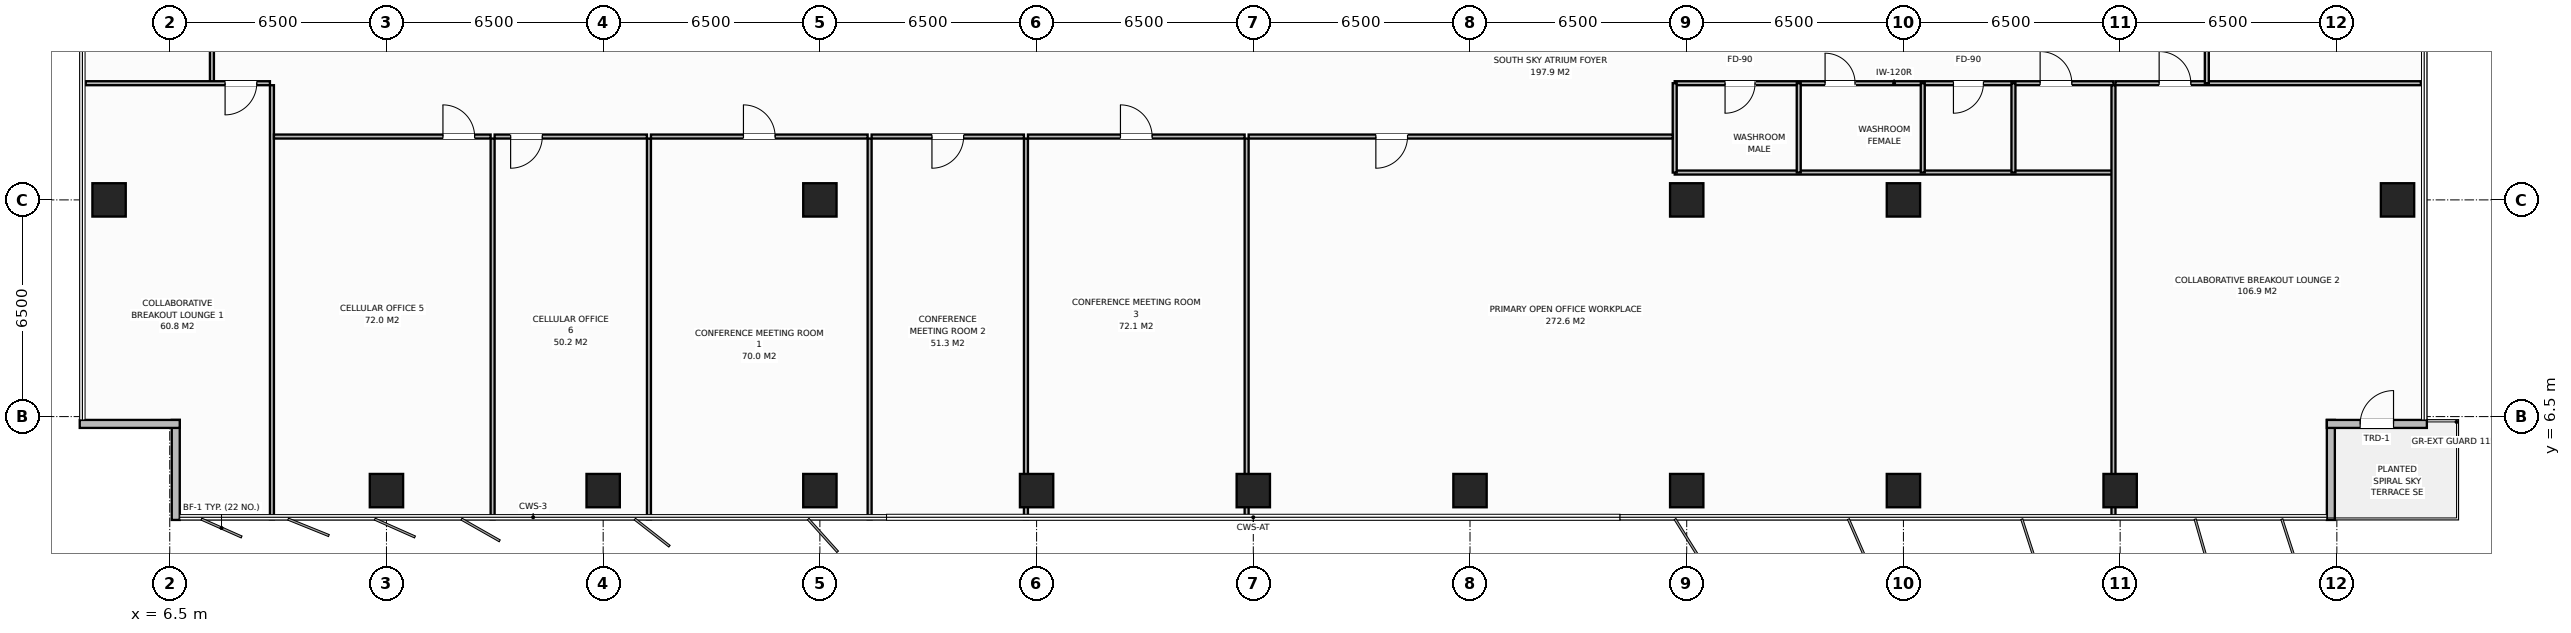
"""IFC4 building model, lengths in metres.
Left out: names, types, materials, properties, quantities, classifications, styles, units other than length and angle.
Written with IfcOpenShell. Run it as: python <this file> out.ifc"""

import sys

from ifc_helpers import new_model, si_unit, direction, frame, frame_2d, origin, origin_2d, place, context, subcontext, project, spatial, rectangle, extrude, element, fill, save


model = new_model("IFC4")
c1 = context("Model", 3, precision=1e-05, world=origin(), true_north=direction((0.0, 1.0)))
c2 = subcontext(c1, "Body", "Model", "MODEL_VIEW")
j1 = project(units=[si_unit("LENGTHUNIT", "METRE"), si_unit("PLANEANGLEUNIT", "RADIAN")], contexts=[c1])
p1 = place(None, origin())
s1 = spatial("IfcSite", under=j1, at=p1, CompositionType="ELEMENT")
p2 = place(p1, origin())
s2 = spatial("IfcBuilding", under=s1, at=p2, CompositionType="ELEMENT")
p3 = place(p2, frame((0.0, 0.0, 182.2)))
s3 = spatial("IfcBuildingStorey", under=s2, at=p3, CompositionType="ELEMENT", Elevation=182.2)
for number, where, z_axis, x_axis in (
    (1, (58.5, 13.0, 0.0), (0.0, 0.0, 1.0), (1.0, 0.0, 0.0)),
    (2, (26.0, 13.0, 0.0), (0.0, 0.0, 1.0), (1.0, 0.0, 0.0)),
    (3, (52.0, 13.0, 0.0), (0.0, 0.0, 1.0), (1.0, 0.0, 0.0)),
    (4, (13.0, 4.28, 0.0), (0.0, 0.0, 1.0), (1.0, 0.0, 0.0)),
    (5, (19.5, 4.28, 0.0), (0.0, 0.0, 1.0), (1.0, 0.0, 0.0)),
    (6, (26.0, 4.28, 0.0), (0.0, 0.0, 1.0), (1.0, 0.0, 0.0)),
    (7, (32.5, 4.28, 0.0), (0.0, 0.0, 1.0), (1.0, 0.0, 0.0)),
    (8, (39.0, 4.28, 0.0), (0.0, 0.0, 1.0), (1.0, 0.0, 0.0)),
    (9, (45.5, 4.28, 0.0), (0.0, 0.0, 1.0), (1.0, 0.0, 0.0)),
    (10, (52.0, 4.28, 0.0), (0.0, 0.0, 1.0), (1.0, 0.0, 0.0)),
    (11, (58.5, 4.28, 0.0), (0.0, 0.0, 1.0), (1.0, 0.0, 0.0)),
    (12, (65.0, 4.28, 0.0), (0.0, 0.0, 1.0), (1.0, 0.0, 0.0)),
    (13, (4.68, 13.0, 0.0), (0.0, 0.0, 1.0), (1.0, 0.0, 0.0)),
    (14, (73.32, 13.0, 0.0), (0.0, 0.0, 1.0), (1.0, 0.0, 0.0)),
):
    element("IfcColumn", number, at=place(p3, frame(where, z_axis=z_axis, x_axis=x_axis)), inside=s3, PredefinedType="COLUMN", context=c2, shape_type="SweptSolid", body=[
        extrude(rectangle(XDim=1.0, YDim=1.0, at=origin_2d()), origin(), (0.0, 0.0, 1.0), 3.8),
    ])
for number, where, z_axis, x_axis in (
    (15, (6.68, 3.4, 0.0), (0.0, 0.0, 1.0), (0.0, 1.0, 0.0)),
    (16, (6.8, 6.28, 0.0), (0.0, 0.0, 1.0), (-1.0, 0.0, 0.0)),
    (17, (71.32, 6.4, 0.0), (0.0, 0.0, 1.0), (0.0, -1.0, 0.0)),
):
    element("IfcWall", number, at=place(p3, frame(where, z_axis=z_axis, x_axis=x_axis)), inside=s3, PredefinedType="STANDARD", context=c2, shape_type="SweptSolid", body=[
        extrude(rectangle(XDim=3.0, YDim=0.24, at=frame_2d((1.5, 0.0))), origin(), (0.0, 0.0, 1.0), 3.572),
    ])
p4 = place(p3, frame((74.2, 6.28, 0.0), z_axis=(0.0, 0.0, 1.0), x_axis=(-1.0, 0.0, 0.0)))
e18 = element("IfcWall", 18, at=p4, inside=s3, PredefinedType="STANDARD", context=c2, shape_type="SweptSolid", body=[
    extrude(rectangle(XDim=3.0, YDim=0.24, at=frame_2d((1.5, 0.0))), origin(), (0.0, 0.0, 1.0), 3.572),
])
p5 = place(p4, frame((1.0, 0.0, 0.0)))
e19 = element("IfcOpeningElement", 19, at=p5, cuts=e18, PredefinedType="OPENING", context=c2, shape_type="SweptSolid", body=[
    extrude(rectangle(XDim=1.0, YDim=2.2, at=frame_2d((0.5, 1.1))), frame((0.0, 0.13, 0.0), z_axis=(0.0, -1.0, 0.0), x_axis=(1.0, 0.0, 0.0)), (0.0, 0.0, 1.0), 0.26),
])
p6 = place(p3, frame((7.765, 16.5, 0.0), z_axis=(0.0, 0.0, 1.0), x_axis=(0.0, 1.0, 0.0)))
e20 = element("IfcWall", 20, at=p6, inside=s3, PredefinedType="PARTITIONING", context=c2, shape_type="SweptSolid", body=[
    extrude(rectangle(XDim=2.1, YDim=0.12, at=frame_2d((1.05, 0.0))), origin(), (0.0, 0.0, 1.0), 3.572),
])
p7 = place(p3, frame((51.64, 16.5, 0.0), z_axis=(0.0, 0.0, 1.0), x_axis=(1.0, 0.0, 0.0)))
e21 = element("IfcWall", 21, at=p7, inside=s3, PredefinedType="PARTITIONING", context=c2, shape_type="SweptSolid", body=[
    extrude(rectangle(XDim=13.16, YDim=0.12, at=frame_2d((6.58, 0.0))), origin(), (0.0, 0.0, 1.0), 3.572),
])
p8 = place(p7, frame((1.51, 0.0, 0.0)))
e22 = element("IfcOpeningElement", 22, at=p8, cuts=e21, PredefinedType="OPENING", context=c2, shape_type="SweptSolid", body=[
    extrude(rectangle(XDim=0.9, YDim=2.15, at=frame_2d((0.45, 1.075))), frame((0.0, 0.07, 0.0), z_axis=(0.0, -1.0, 0.0), x_axis=(1.0, 0.0, 0.0)), (0.0, 0.0, 1.0), 0.14),
])
p9 = place(p7, frame((4.51, 0.0, 0.0)))
e23 = element("IfcOpeningElement", 23, at=p9, cuts=e21, PredefinedType="OPENING", context=c2, shape_type="SweptSolid", body=[
    extrude(rectangle(XDim=0.9, YDim=2.15, at=frame_2d((0.45, 1.075))), frame((0.0, 0.07, 0.0), z_axis=(0.0, -1.0, 0.0), x_axis=(1.0, 0.0, 0.0)), (0.0, 0.0, 1.0), 0.14),
])
p10 = place(p7, frame((8.36, 0.0, 0.0)))
e24 = element("IfcOpeningElement", 24, at=p10, cuts=e21, PredefinedType="OPENING", context=c2, shape_type="SweptSolid", body=[
    extrude(rectangle(XDim=0.9, YDim=2.15, at=frame_2d((0.45, 1.075))), frame((0.0, 0.07, 0.0), z_axis=(0.0, -1.0, 0.0), x_axis=(1.0, 0.0, 0.0)), (0.0, 0.0, 1.0), 0.14),
])
p11 = place(p7, frame((10.96, 0.0, 0.0)))
e25 = element("IfcOpeningElement", 25, at=p11, cuts=e21, PredefinedType="OPENING", context=c2, shape_type="SweptSolid", body=[
    extrude(rectangle(XDim=0.95, YDim=2.15, at=frame_2d((0.475, 1.075))), frame((0.0, 0.07, 0.0), z_axis=(0.0, -1.0, 0.0), x_axis=(1.0, 0.0, 0.0)), (0.0, 0.0, 1.0), 0.14),
])
p12 = place(p3, frame((51.64, 13.82, 0.0), z_axis=(0.0, 0.0, 1.0), x_axis=(1.0, 0.0, 0.0)))
e26 = element("IfcWall", 26, at=p12, inside=s3, PredefinedType="PARTITIONING", context=c2, shape_type="SweptSolid", body=[
    extrude(rectangle(XDim=13.16, YDim=0.12, at=frame_2d((6.58, 0.0))), origin(), (0.0, 0.0, 1.0), 3.572),
])
for number, where, z_axis, x_axis in (
    (27, (51.64, 13.82, 0.0), (0.0, 0.0, 1.0), (0.0, 1.0, 0.0)),
    (28, (55.36, 13.82, 0.0), (0.0, 0.0, 1.0), (0.0, 1.0, 0.0)),
    (29, (59.08, 13.82, 0.0), (0.0, 0.0, 1.0), (0.0, 1.0, 0.0)),
    (30, (61.8, 13.82, 0.0), (0.0, 0.0, 1.0), (0.0, 1.0, 0.0)),
):
    element("IfcWall", number, at=place(p3, frame(where, z_axis=z_axis, x_axis=x_axis)), inside=s3, PredefinedType="PARTITIONING", context=c2, shape_type="SweptSolid", body=[
        extrude(rectangle(XDim=2.68, YDim=0.12, at=frame_2d((1.34, 0.0))), origin(), (0.0, 0.0, 1.0), 3.572),
    ])
p13 = place(p3, frame((9.565, 3.42, 0.0), z_axis=(0.0, 0.0, 1.0), x_axis=(0.0, 1.0, 0.0)))
e31 = element("IfcWall", 31, at=p13, inside=s3, PredefinedType="PARTITIONING", context=c2, shape_type="SweptSolid", body=[
    extrude(rectangle(XDim=13.02, YDim=0.12, at=frame_2d((6.51, 0.0))), origin(), (0.0, 0.0, 1.0), 3.572),
])
p14 = place(p3, frame((3.98, 16.5, 0.0), z_axis=(0.0, 0.0, 1.0), x_axis=(1.0, 0.0, 0.0)))
e32 = element("IfcWall", 32, at=p14, inside=s3, PredefinedType="PARTITIONING", context=c2, shape_type="SweptSolid", body=[
    extrude(rectangle(XDim=5.525, YDim=0.12, at=frame_2d((2.762, 0.0))), origin(), (0.0, 0.0, 1.0), 3.572),
])
p15 = place(p14, frame((4.18, 0.0, 0.0)))
e33 = element("IfcOpeningElement", 33, at=p15, cuts=e32, PredefinedType="OPENING", context=c2, shape_type="SweptSolid", body=[
    extrude(rectangle(XDim=0.95, YDim=2.15, at=frame_2d((0.475, 1.075))), frame((0.0, 0.07, 0.0), z_axis=(0.0, -1.0, 0.0), x_axis=(1.0, 0.0, 0.0)), (0.0, 0.0, 1.0), 0.14),
])
p16 = place(p3, frame((16.184, 3.42, 0.0), z_axis=(0.0, 0.0, 1.0), x_axis=(0.0, 1.0, 0.0)))
e34 = element("IfcWall", 34, at=p16, inside=s3, PredefinedType="PARTITIONING", context=c2, shape_type="SweptSolid", body=[
    extrude(rectangle(XDim=11.42, YDim=0.12, at=frame_2d((5.71, 0.0))), origin(), (0.0, 0.0, 1.0), 3.572),
])
p17 = place(p3, frame((9.625, 14.9, 0.0), z_axis=(0.0, 0.0, 1.0), x_axis=(1.0, 0.0, 0.0)))
e35 = element("IfcWall", 35, at=p17, inside=s3, PredefinedType="PARTITIONING", context=c2, shape_type="SweptSolid", body=[
    extrude(rectangle(XDim=6.499, YDim=0.12, at=frame_2d((3.25, 0.0))), origin(), (0.0, 0.0, 1.0), 3.572),
])
p18 = place(p17, frame((5.069, 0.0, 0.0)))
e36 = element("IfcOpeningElement", 36, at=p18, cuts=e35, PredefinedType="OPENING", context=c2, shape_type="SweptSolid", body=[
    extrude(rectangle(XDim=0.95, YDim=2.15, at=frame_2d((0.475, 1.075))), frame((0.0, 0.07, 0.0), z_axis=(0.0, -1.0, 0.0), x_axis=(1.0, 0.0, 0.0)), (0.0, 0.0, 1.0), 0.14),
])
p19 = place(p3, frame((20.873, 3.42, 0.0), z_axis=(0.0, 0.0, 1.0), x_axis=(0.0, 1.0, 0.0)))
e37 = element("IfcWall", 37, at=p19, inside=s3, PredefinedType="PARTITIONING", context=c2, shape_type="SweptSolid", body=[
    extrude(rectangle(XDim=11.42, YDim=0.12, at=frame_2d((5.71, 0.0))), origin(), (0.0, 0.0, 1.0), 3.572),
])
p20 = place(p3, frame((16.244, 14.9, 0.0), z_axis=(0.0, 0.0, 1.0), x_axis=(1.0, 0.0, 0.0)))
e38 = element("IfcWall", 38, at=p20, inside=s3, PredefinedType="PARTITIONING", context=c2, shape_type="SweptSolid", body=[
    extrude(rectangle(XDim=4.569, YDim=0.12, at=frame_2d((2.284, 0.0))), origin(), (0.0, 0.0, 1.0), 3.572),
])
p21 = place(p20, frame((0.48, 0.0, 0.0)))
e39 = element("IfcOpeningElement", 39, at=p21, cuts=e38, PredefinedType="OPENING", context=c2, shape_type="SweptSolid", body=[
    extrude(rectangle(XDim=0.95, YDim=2.15, at=frame_2d((0.475, 1.075))), frame((0.0, 0.07, 0.0), z_axis=(0.0, -1.0, 0.0), x_axis=(1.0, 0.0, 0.0)), (0.0, 0.0, 1.0), 0.14),
])
p22 = place(p3, frame((27.492, 3.42, 0.0), z_axis=(0.0, 0.0, 1.0), x_axis=(0.0, 1.0, 0.0)))
e40 = element("IfcWall", 40, at=p22, inside=s3, PredefinedType="PARTITIONING", context=c2, shape_type="SweptSolid", body=[
    extrude(rectangle(XDim=11.42, YDim=0.12, at=frame_2d((5.71, 0.0))), origin(), (0.0, 0.0, 1.0), 3.572),
])
p23 = place(p3, frame((20.933, 14.9, 0.0), z_axis=(0.0, 0.0, 1.0), x_axis=(1.0, 0.0, 0.0)))
e41 = element("IfcWall", 41, at=p23, inside=s3, PredefinedType="PARTITIONING", context=c2, shape_type="SweptSolid", body=[
    extrude(rectangle(XDim=6.499, YDim=0.12, at=frame_2d((3.25, 0.0))), origin(), (0.0, 0.0, 1.0), 3.572),
])
p24 = place(p23, frame((2.775, 0.0, 0.0)))
e42 = element("IfcOpeningElement", 42, at=p24, cuts=e41, PredefinedType="OPENING", context=c2, shape_type="SweptSolid", body=[
    extrude(rectangle(XDim=0.95, YDim=2.15, at=frame_2d((0.475, 1.075))), frame((0.0, 0.07, 0.0), z_axis=(0.0, -1.0, 0.0), x_axis=(1.0, 0.0, 0.0)), (0.0, 0.0, 1.0), 0.14),
])
p25 = place(p3, frame((32.181, 3.42, 0.0), z_axis=(0.0, 0.0, 1.0), x_axis=(0.0, 1.0, 0.0)))
e43 = element("IfcWall", 43, at=p25, inside=s3, PredefinedType="PARTITIONING", context=c2, shape_type="SweptSolid", body=[
    extrude(rectangle(XDim=11.42, YDim=0.12, at=frame_2d((5.71, 0.0))), origin(), (0.0, 0.0, 1.0), 3.572),
])
p26 = place(p3, frame((27.552, 14.9, 0.0), z_axis=(0.0, 0.0, 1.0), x_axis=(1.0, 0.0, 0.0)))
e44 = element("IfcWall", 44, at=p26, inside=s3, PredefinedType="PARTITIONING", context=c2, shape_type="SweptSolid", body=[
    extrude(rectangle(XDim=4.569, YDim=0.12, at=frame_2d((2.284, 0.0))), origin(), (0.0, 0.0, 1.0), 3.572),
])
p27 = place(p26, frame((1.809, 0.0, 0.0)))
e45 = element("IfcOpeningElement", 45, at=p27, cuts=e44, PredefinedType="OPENING", context=c2, shape_type="SweptSolid", body=[
    extrude(rectangle(XDim=0.95, YDim=2.15, at=frame_2d((0.475, 1.075))), frame((0.0, 0.07, 0.0), z_axis=(0.0, -1.0, 0.0), x_axis=(1.0, 0.0, 0.0)), (0.0, 0.0, 1.0), 0.14),
])
p28 = place(p3, frame((38.8, 3.42, 0.0), z_axis=(0.0, 0.0, 1.0), x_axis=(0.0, 1.0, 0.0)))
e46 = element("IfcWall", 46, at=p28, inside=s3, PredefinedType="PARTITIONING", context=c2, shape_type="SweptSolid", body=[
    extrude(rectangle(XDim=11.42, YDim=0.12, at=frame_2d((5.71, 0.0))), origin(), (0.0, 0.0, 1.0), 3.022),
])
p29 = place(p3, frame((32.241, 14.9, 0.0), z_axis=(0.0, 0.0, 1.0), x_axis=(1.0, 0.0, 0.0)))
e47 = element("IfcWall", 47, at=p29, inside=s3, PredefinedType="PARTITIONING", context=c2, shape_type="SweptSolid", body=[
    extrude(rectangle(XDim=6.499, YDim=0.12, at=frame_2d((3.25, 0.0))), origin(), (0.0, 0.0, 1.0), 3.572),
])
p30 = place(p29, frame((2.775, 0.0, 0.0)))
e48 = element("IfcOpeningElement", 48, at=p30, cuts=e47, PredefinedType="OPENING", context=c2, shape_type="SweptSolid", body=[
    extrude(rectangle(XDim=0.95, YDim=2.15, at=frame_2d((0.475, 1.075))), frame((0.0, 0.07, 0.0), z_axis=(0.0, -1.0, 0.0), x_axis=(1.0, 0.0, 0.0)), (0.0, 0.0, 1.0), 0.14),
])
p31 = place(p3, frame((64.8, 3.42, 0.0), z_axis=(0.0, 0.0, 1.0), x_axis=(0.0, 1.0, 0.0)))
e49 = element("IfcWall", 49, at=p31, inside=s3, PredefinedType="PARTITIONING", context=c2, shape_type="SweptSolid", body=[
    extrude(rectangle(XDim=13.02, YDim=0.12, at=frame_2d((6.51, 0.0))), origin(), (0.0, 0.0, 1.0), 3.022),
])
p32 = place(p3, frame((38.86, 14.9, 0.0), z_axis=(0.0, 0.0, 1.0), x_axis=(1.0, 0.0, 0.0)))
e50 = element("IfcWall", 50, at=p32, inside=s3, PredefinedType="PARTITIONING", context=c2, shape_type="SweptSolid", body=[
    extrude(rectangle(XDim=12.72, YDim=0.12, at=frame_2d((6.36, 0.0))), origin(), (0.0, 0.0, 1.0), 3.572),
])
p33 = place(p32, frame((3.816, 0.0, 0.0)))
e51 = element("IfcOpeningElement", 51, at=p33, cuts=e50, PredefinedType="OPENING", context=c2, shape_type="SweptSolid", body=[
    extrude(rectangle(XDim=0.95, YDim=2.15, at=frame_2d((0.475, 1.075))), frame((0.0, 0.07, 0.0), z_axis=(0.0, -1.0, 0.0), x_axis=(1.0, 0.0, 0.0)), (0.0, 0.0, 1.0), 0.14),
])
p34 = place(p3, frame((64.86, 16.5, 0.0), z_axis=(0.0, 0.0, 1.0), x_axis=(1.0, 0.0, 0.0)))
e52 = element("IfcWall", 52, at=p34, inside=s3, PredefinedType="PARTITIONING", context=c2, shape_type="SweptSolid", body=[
    extrude(rectangle(XDim=9.16, YDim=0.12, at=frame_2d((4.58, 0.0))), origin(), (0.0, 0.0, 1.0), 3.572),
])
p35 = place(p34, frame((1.31, 0.0, 0.0)))
e53 = element("IfcOpeningElement", 53, at=p35, cuts=e52, PredefinedType="OPENING", context=c2, shape_type="SweptSolid", body=[
    extrude(rectangle(XDim=0.95, YDim=2.15, at=frame_2d((0.475, 1.075))), frame((0.0, 0.07, 0.0), z_axis=(0.0, -1.0, 0.0), x_axis=(1.0, 0.0, 0.0)), (0.0, 0.0, 1.0), 0.14),
])
p36 = place(p3, frame((67.6, 16.5, 0.0), z_axis=(0.0, 0.0, 1.0), x_axis=(0.0, 1.0, 0.0)))
e54 = element("IfcWall", 54, at=p36, inside=s3, PredefinedType="PARTITIONING", context=c2, shape_type="SweptSolid", body=[
    extrude(rectangle(XDim=19.0, YDim=0.12, at=frame_2d((9.5, 0.0))), origin(), (0.0, 0.0, 1.0), 3.572),
])
p37 = place(p36, frame((9.025, 0.0, 0.0)))
e55 = element("IfcOpeningElement", 55, at=p37, cuts=e54, PredefinedType="OPENING", context=c2, shape_type="SweptSolid", body=[
    extrude(rectangle(XDim=0.95, YDim=2.15, at=frame_2d((0.475, 1.075))), frame((0.0, 0.07, 0.0), z_axis=(0.0, -1.0, 0.0), x_axis=(1.0, 0.0, 0.0)), (0.0, 0.0, 1.0), 0.14),
])
p38 = place(p5, origin())
e56 = element("IfcDoor", 56, at=p38, inside=s3, OperationType="SINGLE_SWING_RIGHT", PredefinedType="DOOR", context=c2, shape_type="SweptSolid", body=[
    extrude(rectangle(XDim=1.0, YDim=2.2, at=frame_2d((0.5, 1.1))), frame((0.0, 0.025, 0.0), z_axis=(0.0, -1.0, 0.0), x_axis=(1.0, 0.0, 0.0)), (0.0, 0.0, 1.0), 0.05),
])
fill(e19, e56)
p39 = place(p8, origin())
e57 = element("IfcDoor", 57, at=p39, inside=s3, OperationType="SINGLE_SWING_RIGHT", PredefinedType="DOOR", context=c2, shape_type="SweptSolid", body=[
    extrude(rectangle(XDim=0.9, YDim=2.15, at=frame_2d((0.45, 1.075))), frame((0.0, 0.025, 0.0), z_axis=(0.0, -1.0, 0.0), x_axis=(1.0, 0.0, 0.0)), (0.0, 0.0, 1.0), 0.05),
])
fill(e22, e57)
p40 = place(p9, origin())
e58 = element("IfcDoor", 58, at=p40, inside=s3, OperationType="SINGLE_SWING_LEFT", PredefinedType="DOOR", context=c2, shape_type="SweptSolid", body=[
    extrude(rectangle(XDim=0.9, YDim=2.15, at=frame_2d((0.45, 1.075))), frame((0.0, 0.025, 0.0), z_axis=(0.0, -1.0, 0.0), x_axis=(1.0, 0.0, 0.0)), (0.0, 0.0, 1.0), 0.05),
])
fill(e23, e58)
p41 = place(p10, origin())
e59 = element("IfcDoor", 59, at=p41, inside=s3, OperationType="SINGLE_SWING_RIGHT", PredefinedType="DOOR", context=c2, shape_type="SweptSolid", body=[
    extrude(rectangle(XDim=0.9, YDim=2.15, at=frame_2d((0.45, 1.075))), frame((0.0, 0.025, 0.0), z_axis=(0.0, -1.0, 0.0), x_axis=(1.0, 0.0, 0.0)), (0.0, 0.0, 1.0), 0.05),
])
fill(e24, e59)
p42 = place(p11, origin())
e60 = element("IfcDoor", 60, at=p42, inside=s3, OperationType="SINGLE_SWING_LEFT", PredefinedType="DOOR", context=c2, shape_type="SweptSolid", body=[
    extrude(rectangle(XDim=0.95, YDim=2.15, at=frame_2d((0.475, 1.075))), frame((0.0, 0.025, 0.0), z_axis=(0.0, -1.0, 0.0), x_axis=(1.0, 0.0, 0.0)), (0.0, 0.0, 1.0), 0.05),
])
fill(e25, e60)
p43 = place(p15, origin())
e61 = element("IfcDoor", 61, at=p43, inside=s3, OperationType="SINGLE_SWING_RIGHT", PredefinedType="DOOR", context=c2, shape_type="SweptSolid", body=[
    extrude(rectangle(XDim=0.95, YDim=2.15, at=frame_2d((0.475, 1.075))), frame((0.0, 0.025, 0.0), z_axis=(0.0, -1.0, 0.0), x_axis=(1.0, 0.0, 0.0)), (0.0, 0.0, 1.0), 0.05),
])
fill(e33, e61)
p44 = place(p18, origin())
e62 = element("IfcDoor", 62, at=p44, inside=s3, OperationType="SINGLE_SWING_LEFT", PredefinedType="DOOR", context=c2, shape_type="SweptSolid", body=[
    extrude(rectangle(XDim=0.95, YDim=2.15, at=frame_2d((0.475, 1.075))), frame((0.0, 0.025, 0.0), z_axis=(0.0, -1.0, 0.0), x_axis=(1.0, 0.0, 0.0)), (0.0, 0.0, 1.0), 0.05),
])
fill(e36, e62)
p45 = place(p21, origin())
e63 = element("IfcDoor", 63, at=p45, inside=s3, OperationType="SINGLE_SWING_RIGHT", PredefinedType="DOOR", context=c2, shape_type="SweptSolid", body=[
    extrude(rectangle(XDim=0.95, YDim=2.15, at=frame_2d((0.475, 1.075))), frame((0.0, 0.025, 0.0), z_axis=(0.0, -1.0, 0.0), x_axis=(1.0, 0.0, 0.0)), (0.0, 0.0, 1.0), 0.05),
])
fill(e39, e63)
p46 = place(p24, origin())
e64 = element("IfcDoor", 64, at=p46, inside=s3, OperationType="SINGLE_SWING_LEFT", PredefinedType="DOOR", context=c2, shape_type="SweptSolid", body=[
    extrude(rectangle(XDim=0.95, YDim=2.15, at=frame_2d((0.475, 1.075))), frame((0.0, 0.025, 0.0), z_axis=(0.0, -1.0, 0.0), x_axis=(1.0, 0.0, 0.0)), (0.0, 0.0, 1.0), 0.05),
])
fill(e42, e64)
p47 = place(p27, origin())
e65 = element("IfcDoor", 65, at=p47, inside=s3, OperationType="SINGLE_SWING_RIGHT", PredefinedType="DOOR", context=c2, shape_type="SweptSolid", body=[
    extrude(rectangle(XDim=0.95, YDim=2.15, at=frame_2d((0.475, 1.075))), frame((0.0, 0.025, 0.0), z_axis=(0.0, -1.0, 0.0), x_axis=(1.0, 0.0, 0.0)), (0.0, 0.0, 1.0), 0.05),
])
fill(e45, e65)
p48 = place(p30, origin())
e66 = element("IfcDoor", 66, at=p48, inside=s3, OperationType="SINGLE_SWING_LEFT", PredefinedType="DOOR", context=c2, shape_type="SweptSolid", body=[
    extrude(rectangle(XDim=0.95, YDim=2.15, at=frame_2d((0.475, 1.075))), frame((0.0, 0.025, 0.0), z_axis=(0.0, -1.0, 0.0), x_axis=(1.0, 0.0, 0.0)), (0.0, 0.0, 1.0), 0.05),
])
fill(e48, e66)
p49 = place(p33, origin())
e67 = element("IfcDoor", 67, at=p49, inside=s3, OperationType="SINGLE_SWING_RIGHT", PredefinedType="DOOR", context=c2, shape_type="SweptSolid", body=[
    extrude(rectangle(XDim=0.95, YDim=2.15, at=frame_2d((0.475, 1.075))), frame((0.0, 0.025, 0.0), z_axis=(0.0, -1.0, 0.0), x_axis=(1.0, 0.0, 0.0)), (0.0, 0.0, 1.0), 0.05),
])
fill(e51, e67)
p50 = place(p35, origin())
e68 = element("IfcDoor", 68, at=p50, inside=s3, OperationType="SINGLE_SWING_LEFT", PredefinedType="DOOR", context=c2, shape_type="SweptSolid", body=[
    extrude(rectangle(XDim=0.95, YDim=2.15, at=frame_2d((0.475, 1.075))), frame((0.0, 0.025, 0.0), z_axis=(0.0, -1.0, 0.0), x_axis=(1.0, 0.0, 0.0)), (0.0, 0.0, 1.0), 0.05),
])
fill(e53, e68)
save(model, sys.argv[1])
